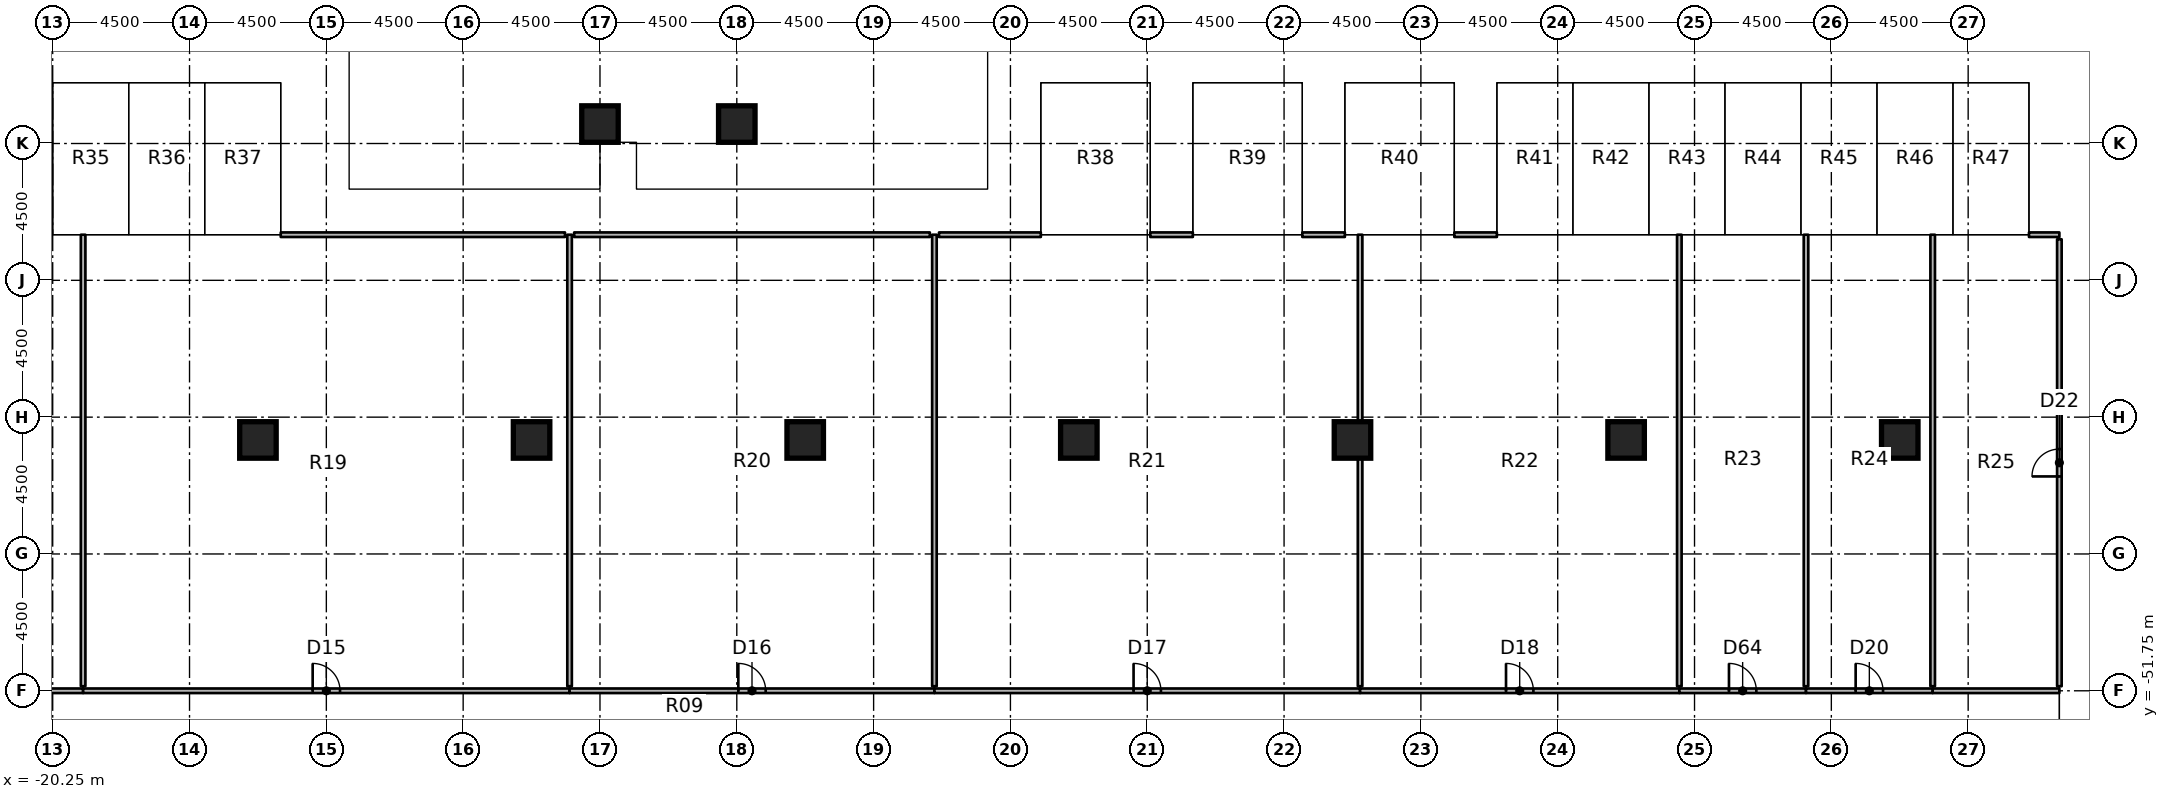
"""IFC4 building model, lengths in metres.
Left out: names, types, materials, properties, quantities, classifications, styles, units other than length and angle.
Written with IfcOpenShell. Run it as: python <this file> out.ifc"""

import sys

from ifc_helpers import new_model, si_unit, direction, frame, frame_2d, origin, origin_2d, place, context, subcontext, project, spatial, rectangle, extrude, element, fill, save


model = new_model("IFC4")
c1 = context("Model", 3, precision=1e-05, world=origin(), true_north=direction((0.0, 1.0)))
c2 = subcontext(c1, "Body", "Model", "MODEL_VIEW")
j1 = project(units=[si_unit("LENGTHUNIT", "METRE"), si_unit("PLANEANGLEUNIT", "RADIAN")], contexts=[c1])
p1 = place(None, origin())
s1 = spatial("IfcSite", under=j1, at=p1, CompositionType="ELEMENT")
p2 = place(p1, origin())
s2 = spatial("IfcBuilding", under=s1, at=p2, CompositionType="ELEMENT")
p3 = place(p2, frame((0.0, 0.0, -4.0)))
s3 = spatial("IfcBuildingStorey", under=s2, at=p3, CompositionType="ELEMENT", Elevation=-4.0)
for number, where, z_axis, x_axis in (
    (1, (-13.5, -43.5, 0.0), (0.0, 0.0, 1.0), (1.0, 0.0, 0.0)),
    (2, (-4.5, -43.5, 0.0), (0.0, 0.0, 1.0), (1.0, 0.0, 0.0)),
    (3, (-2.25, -33.11, 0.0), (0.0, 0.0, 1.0), (1.0, 0.0, 0.0)),
    (4, (2.25, -33.11, 0.0), (0.0, 0.0, 1.0), (1.0, 0.0, 0.0)),
    (5, (4.5, -43.5, 0.0), (0.0, 0.0, 1.0), (1.0, 0.0, 0.0)),
    (6, (13.5, -43.5, 0.0), (0.0, 0.0, 1.0), (1.0, 0.0, 0.0)),
    (7, (22.5, -43.5, 0.0), (0.0, 0.0, 1.0), (1.0, 0.0, 0.0)),
    (8, (31.5, -43.5, 0.0), (0.0, 0.0, 1.0), (1.0, 0.0, 0.0)),
    (9, (40.5, -43.5, 0.0), (0.0, 0.0, 1.0), (1.0, 0.0, 0.0)),
):
    element("IfcColumn", number, at=place(p3, frame(where, z_axis=z_axis, x_axis=x_axis)), inside=s3, PredefinedType="COLUMN", context=c2, shape_type="SweptSolid", body=[
        extrude(rectangle(XDim=1.2, YDim=1.2, at=origin_2d()), origin(), (0.0, 0.0, 1.0), 3.1),
    ])
p4 = place(p3, frame((-30.25, -51.75, 0.0), z_axis=(0.0, 0.0, 1.0), x_axis=(1.0, 0.0, 0.0)))
e10 = element("IfcWall", 10, at=p4, inside=s3, PredefinedType="PARTITIONING", context=c2, shape_type="SweptSolid", body=[
    extrude(rectangle(XDim=11.0, YDim=0.15, at=frame_2d((5.5, 0.0))), origin(), (0.0, 0.0, 1.0), 3.1),
])
p5 = place(p4, frame((5.05, 0.0, 0.0)))
e11 = element("IfcOpeningElement", 11, at=p5, cuts=e10, PredefinedType="OPENING", context=c2, shape_type="SweptSolid", body=[
    extrude(rectangle(XDim=0.9, YDim=2.1, at=frame_2d((0.45, 1.05))), frame((0.0, 0.085, 0.0), z_axis=(0.0, -1.0, 0.0), x_axis=(1.0, 0.0, 0.0)), (0.0, 0.0, 1.0), 0.17),
])
p6 = place(p3, frame((-19.25, -51.75, 0.0), z_axis=(0.0, 0.0, 1.0), x_axis=(1.0, 0.0, 0.0)))
e12 = element("IfcWall", 12, at=p6, inside=s3, PredefinedType="PARTITIONING", context=c2, shape_type="SweptSolid", body=[
    extrude(rectangle(XDim=16.0, YDim=0.15, at=frame_2d((8.0, 0.0))), origin(), (0.0, 0.0, 1.0), 3.1),
])
p7 = place(p6, frame((7.55, 0.0, 0.0)))
e13 = element("IfcOpeningElement", 13, at=p7, cuts=e12, PredefinedType="OPENING", context=c2, shape_type="SweptSolid", body=[
    extrude(rectangle(XDim=0.9, YDim=2.1, at=frame_2d((0.45, 1.05))), frame((0.0, 0.085, 0.0), z_axis=(0.0, -1.0, 0.0), x_axis=(1.0, 0.0, 0.0)), (0.0, 0.0, 1.0), 0.17),
])
p8 = place(p3, frame((-3.25, -51.75, 0.0), z_axis=(0.0, 0.0, 1.0), x_axis=(1.0, 0.0, 0.0)))
e14 = element("IfcWall", 14, at=p8, inside=s3, PredefinedType="PARTITIONING", context=c2, shape_type="SweptSolid", body=[
    extrude(rectangle(XDim=12.0, YDim=0.15, at=frame_2d((6.0, 0.0))), origin(), (0.0, 0.0, 1.0), 3.1),
])
p9 = place(p8, frame((5.55, 0.0, 0.0)))
e15 = element("IfcOpeningElement", 15, at=p9, cuts=e14, PredefinedType="OPENING", context=c2, shape_type="SweptSolid", body=[
    extrude(rectangle(XDim=0.9, YDim=2.1, at=frame_2d((0.45, 1.05))), frame((0.0, 0.085, 0.0), z_axis=(0.0, -1.0, 0.0), x_axis=(1.0, 0.0, 0.0)), (0.0, 0.0, 1.0), 0.17),
])
p10 = place(p3, frame((8.75, -51.75, 0.0), z_axis=(0.0, 0.0, 1.0), x_axis=(1.0, 0.0, 0.0)))
e16 = element("IfcWall", 16, at=p10, inside=s3, PredefinedType="PARTITIONING", context=c2, shape_type="SweptSolid", body=[
    extrude(rectangle(XDim=14.0, YDim=0.15, at=frame_2d((7.0, 0.0))), origin(), (0.0, 0.0, 1.0), 3.1),
])
p11 = place(p10, frame((6.55, 0.0, 0.0)))
e17 = element("IfcOpeningElement", 17, at=p11, cuts=e16, PredefinedType="OPENING", context=c2, shape_type="SweptSolid", body=[
    extrude(rectangle(XDim=0.9, YDim=2.1, at=frame_2d((0.45, 1.05))), frame((0.0, 0.085, 0.0), z_axis=(0.0, -1.0, 0.0), x_axis=(1.0, 0.0, 0.0)), (0.0, 0.0, 1.0), 0.17),
])
p12 = place(p3, frame((22.75, -51.75, 0.0), z_axis=(0.0, 0.0, 1.0), x_axis=(1.0, 0.0, 0.0)))
e18 = element("IfcWall", 18, at=p12, inside=s3, PredefinedType="PARTITIONING", context=c2, shape_type="SweptSolid", body=[
    extrude(rectangle(XDim=10.5, YDim=0.15, at=frame_2d((5.25, 0.0))), origin(), (0.0, 0.0, 1.0), 3.1),
])
p13 = place(p12, frame((4.8, 0.0, 0.0)))
e19 = element("IfcOpeningElement", 19, at=p13, cuts=e18, PredefinedType="OPENING", context=c2, shape_type="SweptSolid", body=[
    extrude(rectangle(XDim=0.9, YDim=2.1, at=frame_2d((0.45, 1.05))), frame((0.0, 0.085, 0.0), z_axis=(0.0, -1.0, 0.0), x_axis=(1.0, 0.0, 0.0)), (0.0, 0.0, 1.0), 0.17),
])
p14 = place(p3, frame((33.25, -51.75, 0.0), z_axis=(0.0, 0.0, 1.0), x_axis=(1.0, 0.0, 0.0)))
e20 = element("IfcWall", 20, at=p14, inside=s3, PredefinedType="PARTITIONING", context=c2, shape_type="SweptSolid", body=[
    extrude(rectangle(XDim=4.167, YDim=0.15, at=frame_2d((2.083, 0.0))), origin(), (0.0, 0.0, 1.0), 3.1),
])
p15 = place(p14, frame((1.633, 0.0, 0.0)))
e21 = element("IfcOpeningElement", 21, at=p15, cuts=e20, PredefinedType="OPENING", context=c2, shape_type="SweptSolid", body=[
    extrude(rectangle(XDim=0.9, YDim=2.1, at=frame_2d((0.45, 1.05))), frame((0.0, 0.085, 0.0), z_axis=(0.0, -1.0, 0.0), x_axis=(1.0, 0.0, 0.0)), (0.0, 0.0, 1.0), 0.17),
])
p16 = place(p3, frame((37.417, -51.75, 0.0), z_axis=(0.0, 0.0, 1.0), x_axis=(1.0, 0.0, 0.0)))
e22 = element("IfcWall", 22, at=p16, inside=s3, PredefinedType="PARTITIONING", context=c2, shape_type="SweptSolid", body=[
    extrude(rectangle(XDim=4.167, YDim=0.15, at=frame_2d((2.083, 0.0))), origin(), (0.0, 0.0, 1.0), 3.1),
])
p17 = place(p16, frame((1.633, 0.0, 0.0)))
e23 = element("IfcOpeningElement", 23, at=p17, cuts=e22, PredefinedType="OPENING", context=c2, shape_type="SweptSolid", body=[
    extrude(rectangle(XDim=0.9, YDim=2.1, at=frame_2d((0.45, 1.05))), frame((0.0, 0.085, 0.0), z_axis=(0.0, -1.0, 0.0), x_axis=(1.0, 0.0, 0.0)), (0.0, 0.0, 1.0), 0.17),
])
p18 = place(p3, frame((41.583, -51.75, 0.0), z_axis=(0.0, 0.0, 1.0), x_axis=(1.0, 0.0, 0.0)))
e24 = element("IfcWall", 24, at=p18, inside=s3, PredefinedType="PARTITIONING", context=c2, shape_type="SweptSolid", body=[
    extrude(rectangle(XDim=4.167, YDim=0.15, at=frame_2d((2.083, 0.0))), origin(), (0.0, 0.0, 1.0), 3.1),
])
for number, where, z_axis, x_axis in (
    (25, (-19.25, -36.75, 0.0), (0.0, 0.0, 1.0), (0.0, -1.0, 0.0)),
    (26, (-3.25, -36.75, 0.0), (0.0, 0.0, 1.0), (0.0, -1.0, 0.0)),
):
    element("IfcWall", number, at=place(p3, frame(where, z_axis=z_axis, x_axis=x_axis)), inside=s3, PredefinedType="PARTITIONING", context=c2, shape_type="SweptSolid", body=[
        extrude(rectangle(XDim=14.85, YDim=0.15, at=frame_2d((7.425, 0.0))), origin(), (0.0, 0.0, 1.0), 3.1),
    ])
p19 = place(p3, frame((-12.75, -36.75, 0.0), z_axis=(0.0, 0.0, 1.0), x_axis=(1.0, 0.0, 0.0)))
e27 = element("IfcWall", 27, at=p19, inside=s3, PredefinedType="PARTITIONING", context=c2, shape_type="SweptSolid", body=[
    extrude(rectangle(XDim=9.35, YDim=0.15, at=frame_2d((4.675, 0.0))), origin(), (0.0, 0.0, 1.0), 3.1),
])
p20 = place(p3, frame((8.75, -36.75, 0.0), z_axis=(0.0, 0.0, 1.0), x_axis=(0.0, -1.0, 0.0)))
e28 = element("IfcWall", 28, at=p20, inside=s3, PredefinedType="PARTITIONING", context=c2, shape_type="SweptSolid", body=[
    extrude(rectangle(XDim=14.85, YDim=0.15, at=frame_2d((7.425, 0.0))), origin(), (0.0, 0.0, 1.0), 3.1),
])
p21 = place(p3, frame((-3.1, -36.75, 0.0), z_axis=(0.0, 0.0, 1.0), x_axis=(1.0, 0.0, 0.0)))
e29 = element("IfcWall", 29, at=p21, inside=s3, PredefinedType="PARTITIONING", context=c2, shape_type="SweptSolid", body=[
    extrude(rectangle(XDim=11.7, YDim=0.15, at=frame_2d((5.85, 0.0))), origin(), (0.0, 0.0, 1.0), 3.1),
])
p22 = place(p3, frame((22.75, -36.75, 0.0), z_axis=(0.0, 0.0, 1.0), x_axis=(0.0, -1.0, 0.0)))
e30 = element("IfcWall", 30, at=p22, inside=s3, PredefinedType="PARTITIONING", context=c2, shape_type="SweptSolid", body=[
    extrude(rectangle(XDim=6.15, YDim=0.15, at=frame_2d((3.075, 0.0))), origin(), (0.0, 0.0, 1.0), 3.1),
])
p23 = place(p3, frame((22.75, -44.1, 0.0), z_axis=(0.0, 0.0, 1.0), x_axis=(0.0, -1.0, 0.0)))
e31 = element("IfcWall", 31, at=p23, inside=s3, PredefinedType="PARTITIONING", context=c2, shape_type="SweptSolid", body=[
    extrude(rectangle(XDim=7.5, YDim=0.15, at=frame_2d((3.75, 0.0))), origin(), (0.0, 0.0, 1.0), 3.1),
])
p24 = place(p3, frame((8.9, -36.75, 0.0), z_axis=(0.0, 0.0, 1.0), x_axis=(1.0, 0.0, 0.0)))
e32 = element("IfcWall", 32, at=p24, inside=s3, PredefinedType="PARTITIONING", context=c2, shape_type="SweptSolid", body=[
    extrude(rectangle(XDim=3.35, YDim=0.15, at=frame_2d((1.675, 0.0))), origin(), (0.0, 0.0, 1.0), 3.1),
])
for number, where, z_axis, x_axis in (
    (33, (15.85, -36.75, 0.0), (0.0, 0.0, 1.0), (1.0, 0.0, 0.0)),
    (34, (20.85, -36.75, 0.0), (0.0, 0.0, 1.0), (1.0, 0.0, 0.0)),
):
    element("IfcWall", number, at=place(p3, frame(where, z_axis=z_axis, x_axis=x_axis)), inside=s3, PredefinedType="PARTITIONING", context=c2, shape_type="SweptSolid", body=[
        extrude(rectangle(XDim=1.4, YDim=0.15, at=frame_2d((0.7, 0.0))), origin(), (0.0, 0.0, 1.0), 3.1),
    ])
p25 = place(p3, frame((33.25, -36.75, 0.0), z_axis=(0.0, 0.0, 1.0), x_axis=(0.0, -1.0, 0.0)))
e35 = element("IfcWall", 35, at=p25, inside=s3, PredefinedType="PARTITIONING", context=c2, shape_type="SweptSolid", body=[
    extrude(rectangle(XDim=14.85, YDim=0.15, at=frame_2d((7.425, 0.0))), origin(), (0.0, 0.0, 1.0), 3.1),
])
p26 = place(p3, frame((25.85, -36.75, 0.0), z_axis=(0.0, 0.0, 1.0), x_axis=(1.0, 0.0, 0.0)))
e36 = element("IfcWall", 36, at=p26, inside=s3, PredefinedType="PARTITIONING", context=c2, shape_type="SweptSolid", body=[
    extrude(rectangle(XDim=1.4, YDim=0.15, at=frame_2d((0.7, 0.0))), origin(), (0.0, 0.0, 1.0), 3.1),
])
for number, where, z_axis, x_axis in (
    (37, (37.417, -36.75, 0.0), (0.0, 0.0, 1.0), (0.0, -1.0, 0.0)),
    (38, (41.583, -36.75, 0.0), (0.0, 0.0, 1.0), (0.0, -1.0, 0.0)),
):
    element("IfcWall", number, at=place(p3, frame(where, z_axis=z_axis, x_axis=x_axis)), inside=s3, PredefinedType="PARTITIONING", context=c2, shape_type="SweptSolid", body=[
        extrude(rectangle(XDim=14.85, YDim=0.15, at=frame_2d((7.425, 0.0))), origin(), (0.0, 0.0, 1.0), 3.1),
    ])
p27 = place(p3, frame((44.75, -36.75, 0.0), z_axis=(0.0, 0.0, 1.0), x_axis=(1.0, 0.0, 0.0)))
e39 = element("IfcWall", 39, at=p27, inside=s3, PredefinedType="PARTITIONING", context=c2, shape_type="SweptSolid", body=[
    extrude(rectangle(XDim=1.0, YDim=0.15, at=frame_2d((0.5, 0.0))), origin(), (0.0, 0.0, 1.0), 3.1),
])
p28 = place(p3, frame((45.75, -51.6, 0.0), z_axis=(0.0, 0.0, 1.0), x_axis=(0.0, 1.0, 0.0)))
e40 = element("IfcWall", 40, at=p28, inside=s3, PredefinedType="PARTITIONING", context=c2, shape_type="SweptSolid", body=[
    extrude(rectangle(XDim=14.7, YDim=0.15, at=frame_2d((7.35, 0.0))), origin(), (0.0, 0.0, 1.0), 3.1),
])
p29 = place(p28, frame((6.9, 0.0, 0.0)))
e41 = element("IfcOpeningElement", 41, at=p29, cuts=e40, PredefinedType="OPENING", context=c2, shape_type="SweptSolid", body=[
    extrude(rectangle(XDim=0.9, YDim=2.1, at=frame_2d((0.45, 1.05))), frame((0.0, 0.085, 0.0), z_axis=(0.0, -1.0, 0.0), x_axis=(1.0, 0.0, 0.0)), (0.0, 0.0, 1.0), 0.17),
])
p30 = place(p7, origin())
e42 = element("IfcDoor", 42, at=p30, inside=s3, OperationType="SINGLE_SWING_LEFT", PredefinedType="DOOR", context=c2, shape_type="SweptSolid", body=[
    extrude(rectangle(XDim=0.9, YDim=2.1, at=frame_2d((0.45, 1.05))), frame((0.0, 0.025, 0.0), z_axis=(0.0, -1.0, 0.0), x_axis=(1.0, 0.0, 0.0)), (0.0, 0.0, 1.0), 0.05),
])
fill(e13, e42)
p31 = place(p9, origin())
e43 = element("IfcDoor", 43, at=p31, inside=s3, OperationType="SINGLE_SWING_LEFT", PredefinedType="DOOR", context=c2, shape_type="SweptSolid", body=[
    extrude(rectangle(XDim=0.9, YDim=2.1, at=frame_2d((0.45, 1.05))), frame((0.0, 0.025, 0.0), z_axis=(0.0, -1.0, 0.0), x_axis=(1.0, 0.0, 0.0)), (0.0, 0.0, 1.0), 0.05),
])
fill(e15, e43)
p32 = place(p11, origin())
e44 = element("IfcDoor", 44, at=p32, inside=s3, OperationType="SINGLE_SWING_LEFT", PredefinedType="DOOR", context=c2, shape_type="SweptSolid", body=[
    extrude(rectangle(XDim=0.9, YDim=2.1, at=frame_2d((0.45, 1.05))), frame((0.0, 0.025, 0.0), z_axis=(0.0, -1.0, 0.0), x_axis=(1.0, 0.0, 0.0)), (0.0, 0.0, 1.0), 0.05),
])
fill(e17, e44)
p33 = place(p13, origin())
e45 = element("IfcDoor", 45, at=p33, inside=s3, OperationType="SINGLE_SWING_LEFT", PredefinedType="DOOR", context=c2, shape_type="SweptSolid", body=[
    extrude(rectangle(XDim=0.9, YDim=2.1, at=frame_2d((0.45, 1.05))), frame((0.0, 0.025, 0.0), z_axis=(0.0, -1.0, 0.0), x_axis=(1.0, 0.0, 0.0)), (0.0, 0.0, 1.0), 0.05),
])
fill(e19, e45)
p34 = place(p15, origin())
e46 = element("IfcDoor", 46, at=p34, inside=s3, OperationType="SINGLE_SWING_LEFT", PredefinedType="DOOR", context=c2, shape_type="SweptSolid", body=[
    extrude(rectangle(XDim=0.9, YDim=2.1, at=frame_2d((0.45, 1.05))), frame((0.0, 0.025, 0.0), z_axis=(0.0, -1.0, 0.0), x_axis=(1.0, 0.0, 0.0)), (0.0, 0.0, 1.0), 0.05),
])
fill(e21, e46)
p35 = place(p17, origin())
e47 = element("IfcDoor", 47, at=p35, inside=s3, OperationType="SINGLE_SWING_LEFT", PredefinedType="DOOR", context=c2, shape_type="SweptSolid", body=[
    extrude(rectangle(XDim=0.9, YDim=2.1, at=frame_2d((0.45, 1.05))), frame((0.0, 0.025, 0.0), z_axis=(0.0, -1.0, 0.0), x_axis=(1.0, 0.0, 0.0)), (0.0, 0.0, 1.0), 0.05),
])
fill(e23, e47)
p36 = place(p29, origin())
e48 = element("IfcDoor", 48, at=p36, inside=s3, OperationType="SINGLE_SWING_LEFT", PredefinedType="DOOR", context=c2, shape_type="SweptSolid", body=[
    extrude(rectangle(XDim=0.9, YDim=2.1, at=frame_2d((0.45, 1.05))), frame((0.0, 0.025, 0.0), z_axis=(0.0, -1.0, 0.0), x_axis=(1.0, 0.0, 0.0)), (0.0, 0.0, 1.0), 0.05),
])
fill(e41, e48)
save(model, sys.argv[1])
